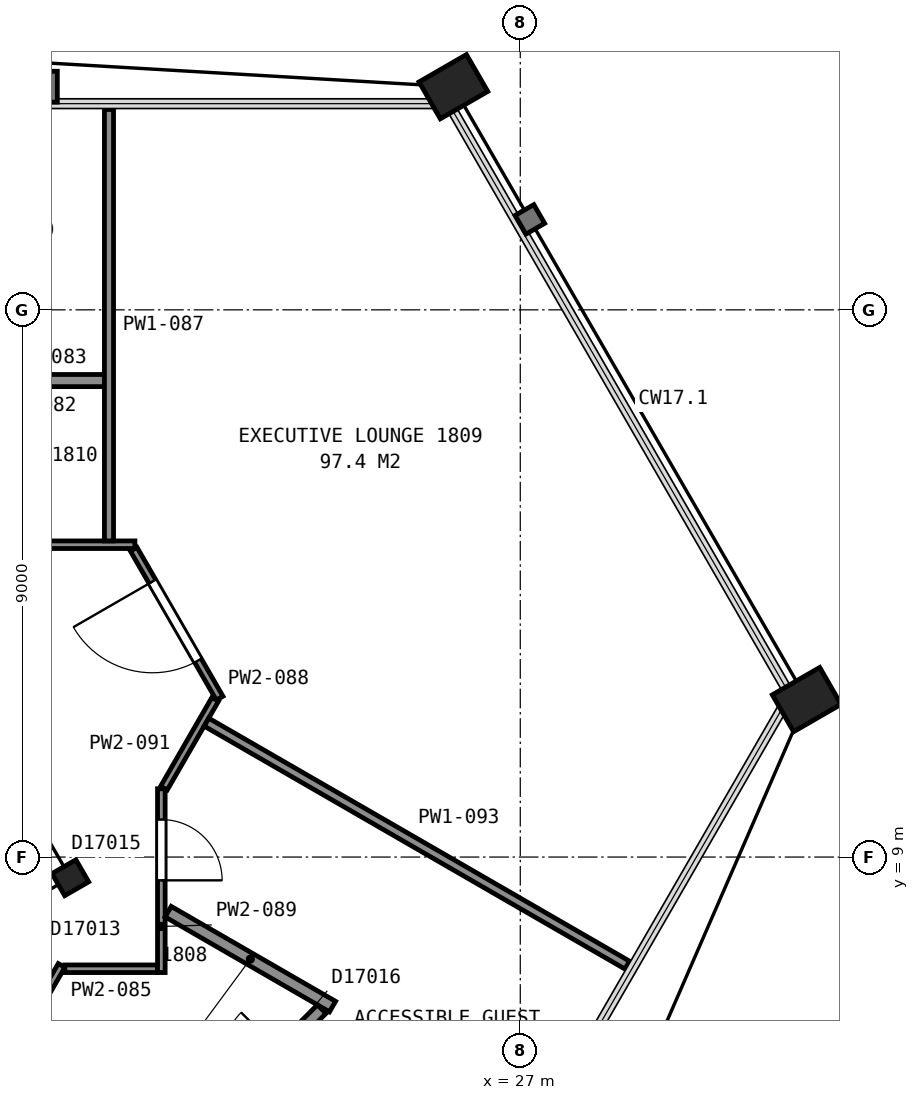
"""IFC4 building model, lengths in metres.
Left out: names, types, materials, properties, quantities, classifications, styles, units other than length and angle.
Written with IfcOpenShell. Run it as: python <this file> out.ifc"""

import sys

from ifc_helpers import new_model, si_unit, direction, frame, frame_2d, origin, origin_2d, place, context, subcontext, project, spatial, rectangle, hollow_rectangle, i_section, extrude, element, fill, save


model = new_model("IFC4")
c1 = context("Model", 3, precision=1e-05, world=origin(), true_north=direction((0.0, 1.0)))
c2 = subcontext(c1, "Body", "Model", "MODEL_VIEW")
j1 = project(units=[si_unit("LENGTHUNIT", "METRE"), si_unit("PLANEANGLEUNIT", "RADIAN")], contexts=[c1])
p1 = place(None, origin())
s1 = spatial("IfcSite", under=j1, at=p1, CompositionType="ELEMENT")
p2 = place(p1, origin())
s2 = spatial("IfcBuilding", under=s1, at=p2, CompositionType="ELEMENT")
p3 = place(p2, frame((0.0, 0.0, 80.0)))
s3 = spatial("IfcBuildingStorey", under=s2, at=p3, CompositionType="ELEMENT", Elevation=80.0)
for number, where, z_axis, x_axis in (
    (1, (25.9, 21.67, 0.0), (0.0, 0.0, 1.0), (0.5, -0.866, 0.0)),
    (2, (31.71, 11.59, 0.0), (0.0, 0.0, 1.0), (0.5, -0.866, 0.0)),
):
    element("IfcColumn", number, at=place(p3, frame(where, z_axis=z_axis, x_axis=x_axis)), inside=s3, PredefinedType="COLUMN", context=c2, shape_type="SweptSolid", body=[
        extrude(hollow_rectangle(XDim=0.7, YDim=0.9, WallThickness=0.065, at=origin_2d()), origin(), (0.0, 0.0, 1.0), 3.6),
    ])
p4 = place(p3, frame((19.6, 8.66, 0.0), z_axis=(0.0, 0.0, 1.0), x_axis=(0.5, -0.866025403784, 0.0)))
e3 = element("IfcColumn", 3, at=p4, inside=s3, PredefinedType="COLUMN", context=c2, shape_type="SweptSolid", body=[
    extrude(i_section(OverallWidth=0.419, OverallDepth=0.455, WebThickness=0.042, FlangeThickness=0.068, FilletRadius=0.015, at=origin_2d()), origin(), (0.0, 0.0, 1.0), 3.6),
])
p5 = place(p3, frame((-20.663, 14.137, 0.0), z_axis=(0.0, 0.0, 1.0), x_axis=(1.0, 0.0, 0.0)))
e4 = element("IfcWall", 4, at=p5, inside=s3, PredefinedType="PARTITIONING", context=c2, shape_type="SweptSolid", body=[
    extrude(rectangle(XDim=41.325, YDim=0.125, at=frame_2d((20.663, 0.0))), origin(), (0.0, 0.0, 1.0), 2.613),
])
p6 = place(p5, frame((37.071, 0.0, 0.0)))
e5 = element("IfcOpeningElement", 5, at=p6, cuts=e4, PredefinedType="OPENING", context=c2, shape_type="SweptSolid", body=[
    extrude(rectangle(XDim=0.9, YDim=2.1, at=frame_2d((0.45, 1.05))), frame((0.0, 0.073, 0.0), z_axis=(0.0, -1.0, 0.0), x_axis=(1.0, 0.0, 0.0)), (0.0, 0.0, 1.0), 0.145),
])
p7 = place(p5, frame((34.272, 0.0, 0.0)))
e6 = element("IfcOpeningElement", 6, at=p7, cuts=e4, PredefinedType="OPENING", context=c2, shape_type="SweptSolid", body=[
    extrude(rectangle(XDim=1.0, YDim=2.1, at=frame_2d((0.5, 1.05))), frame((0.0, 0.073, 0.0), z_axis=(0.0, -1.0, 0.0), x_axis=(1.0, 0.0, 0.0)), (0.0, 0.0, 1.0), 0.145),
])
p8 = place(p5, frame((26.496, 0.0, 0.0)))
e7 = element("IfcOpeningElement", 7, at=p8, cuts=e4, PredefinedType="OPENING", context=c2, shape_type="SweptSolid", body=[
    extrude(rectangle(XDim=0.9, YDim=2.1, at=frame_2d((0.45, 1.05))), frame((0.0, 0.073, 0.0), z_axis=(0.0, -1.0, 0.0), x_axis=(1.0, 0.0, 0.0)), (0.0, 0.0, 1.0), 0.145),
])
p9 = place(p5, frame((23.917, 0.0, 0.0)))
e8 = element("IfcOpeningElement", 8, at=p9, cuts=e4, PredefinedType="OPENING", context=c2, shape_type="SweptSolid", body=[
    extrude(rectangle(XDim=0.9, YDim=2.1, at=frame_2d((0.45, 1.05))), frame((0.0, 0.073, 0.0), z_axis=(0.0, -1.0, 0.0), x_axis=(1.0, 0.0, 0.0)), (0.0, 0.0, 1.0), 0.145),
])
p10 = place(p5, frame((16.78, 0.0, 0.0)))
e9 = element("IfcOpeningElement", 9, at=p10, cuts=e4, PredefinedType="OPENING", context=c2, shape_type="SweptSolid", body=[
    extrude(rectangle(XDim=0.9, YDim=2.1, at=frame_2d((0.45, 1.05))), frame((0.0, 0.073, 0.0), z_axis=(0.0, -1.0, 0.0), x_axis=(1.0, 0.0, 0.0)), (0.0, 0.0, 1.0), 0.145),
])
p11 = place(p5, frame((13.952, 0.0, 0.0)))
e10 = element("IfcOpeningElement", 10, at=p11, cuts=e4, PredefinedType="OPENING", context=c2, shape_type="SweptSolid", body=[
    extrude(rectangle(XDim=0.9, YDim=2.1, at=frame_2d((0.45, 1.05))), frame((0.0, 0.073, 0.0), z_axis=(0.0, -1.0, 0.0), x_axis=(1.0, 0.0, 0.0)), (0.0, 0.0, 1.0), 0.145),
])
p12 = place(p5, frame((7.175, 0.0, 0.0)))
e11 = element("IfcOpeningElement", 11, at=p12, cuts=e4, PredefinedType="OPENING", context=c2, shape_type="SweptSolid", body=[
    extrude(rectangle(XDim=0.9, YDim=2.1, at=frame_2d((0.45, 1.05))), frame((0.0, 0.073, 0.0), z_axis=(0.0, -1.0, 0.0), x_axis=(1.0, 0.0, 0.0)), (0.0, 0.0, 1.0), 0.145),
])
p13 = place(p5, frame((4.376, 0.0, 0.0)))
e12 = element("IfcOpeningElement", 12, at=p13, cuts=e4, PredefinedType="OPENING", context=c2, shape_type="SweptSolid", body=[
    extrude(rectangle(XDim=1.0, YDim=2.1, at=frame_2d((0.5, 1.05))), frame((0.0, 0.073, 0.0), z_axis=(0.0, -1.0, 0.0), x_axis=(1.0, 0.0, 0.0)), (0.0, 0.0, 1.0), 0.145),
])
p14 = place(p3, frame((19.456, 7.217, 0.0), z_axis=(0.0, 0.0, 1.0), x_axis=(-0.50002170027, -0.866012874765, 0.0)))
e13 = element("IfcWall", 13, at=p14, inside=s3, PredefinedType="PARTITIONING", context=c2, shape_type="SweptSolid", body=[
    extrude(rectangle(XDim=31.379, YDim=0.125, at=frame_2d((15.69, 0.0))), origin(), (0.0, 0.0, 1.0), 2.613),
])
p15 = place(p14, frame((26.843, 0.0, 0.0)))
e14 = element("IfcOpeningElement", 14, at=p15, cuts=e13, PredefinedType="OPENING", context=c2, shape_type="SweptSolid", body=[
    extrude(rectangle(XDim=1.0, YDim=2.1, at=frame_2d((0.5, 1.05))), frame((0.0, 0.073, 0.0), z_axis=(0.0, -1.0, 0.0), x_axis=(1.0, 0.0, 0.0)), (0.0, 0.0, 1.0), 0.145),
])
p16 = place(p14, frame((24.03, 0.0, 0.0)))
e15 = element("IfcOpeningElement", 15, at=p16, cuts=e13, PredefinedType="OPENING", context=c2, shape_type="SweptSolid", body=[
    extrude(rectangle(XDim=0.9, YDim=2.1, at=frame_2d((0.45, 1.05))), frame((0.0, 0.073, 0.0), z_axis=(0.0, -1.0, 0.0), x_axis=(1.0, 0.0, 0.0)), (0.0, 0.0, 1.0), 0.145),
])
p17 = place(p14, frame((17.159, 0.0, 0.0)))
e16 = element("IfcOpeningElement", 16, at=p17, cuts=e13, PredefinedType="OPENING", context=c2, shape_type="SweptSolid", body=[
    extrude(rectangle(XDim=0.9, YDim=2.1, at=frame_2d((0.45, 1.05))), frame((0.0, 0.073, 0.0), z_axis=(0.0, -1.0, 0.0), x_axis=(1.0, 0.0, 0.0)), (0.0, 0.0, 1.0), 0.145),
])
p18 = place(p14, frame((14.24, 0.0, 0.0)))
e17 = element("IfcOpeningElement", 17, at=p18, cuts=e13, PredefinedType="OPENING", context=c2, shape_type="SweptSolid", body=[
    extrude(rectangle(XDim=0.9, YDim=2.1, at=frame_2d((0.45, 1.05))), frame((0.0, 0.073, 0.0), z_axis=(0.0, -1.0, 0.0), x_axis=(1.0, 0.0, 0.0)), (0.0, 0.0, 1.0), 0.145),
])
p19 = place(p14, frame((6.997, 0.0, 0.0)))
e18 = element("IfcOpeningElement", 18, at=p19, cuts=e13, PredefinedType="OPENING", context=c2, shape_type="SweptSolid", body=[
    extrude(rectangle(XDim=0.9, YDim=2.1, at=frame_2d((0.45, 1.05))), frame((0.0, 0.073, 0.0), z_axis=(0.0, -1.0, 0.0), x_axis=(1.0, 0.0, 0.0)), (0.0, 0.0, 1.0), 0.145),
])
p20 = place(p14, frame((4.327, 0.0, 0.0)))
e19 = element("IfcOpeningElement", 19, at=p20, cuts=e13, PredefinedType="OPENING", context=c2, shape_type="SweptSolid", body=[
    extrude(rectangle(XDim=0.9, YDim=2.1, at=frame_2d((0.45, 1.05))), frame((0.0, 0.073, 0.0), z_axis=(0.0, -1.0, 0.0), x_axis=(1.0, 0.0, 0.0)), (0.0, 0.0, 1.0), 0.145),
])
p21 = place(p3, frame((18.236, 16.837, 0.0), z_axis=(0.0, 0.0, 1.0), x_axis=(1.0, 0.0, 0.0)))
e20 = element("IfcWall", 20, at=p21, inside=s3, PredefinedType="PARTITIONING", context=c2, shape_type="SweptSolid", body=[
    extrude(rectangle(XDim=1.925, YDim=0.2, at=frame_2d((0.962, 0.0))), origin(), (0.0, 0.0, 1.0), 2.613),
])
p22 = place(p3, frame((19.51, 7.163, 0.0), z_axis=(0.0, 0.0, 1.0), x_axis=(1.0, 0.0, 0.0)))
e21 = element("IfcWall", 21, at=p22, inside=s3, PredefinedType="PARTITIONING", context=c2, shape_type="SweptSolid", body=[
    extrude(rectangle(XDim=1.522, YDim=0.125, at=frame_2d((0.761, 0.0))), origin(), (0.0, 0.0, 1.0), 2.613),
])
p23 = place(p3, frame((20.236, 14.199, 0.0), z_axis=(0.0, 0.0, 1.0), x_axis=(0.0, 1.0, 0.0)))
e22 = element("IfcWall", 22, at=p23, inside=s3, PredefinedType="PARTITIONING", context=c2, shape_type="SweptSolid", body=[
    extrude(rectangle(XDim=7.095, YDim=0.15, at=frame_2d((3.548, 0.0))), origin(), (0.0, 0.0, 1.0), 2.613),
])
p24 = place(p3, frame((20.643, 14.063, 0.0), z_axis=(0.0, 0.0, 1.0), x_axis=(0.499647745683, -0.866228682412, 0.0)))
e23 = element("IfcWall", 23, at=p24, inside=s3, PredefinedType="PARTITIONING", context=c2, shape_type="SweptSolid", body=[
    extrude(rectangle(XDim=2.829, YDim=0.125, at=frame_2d((1.415, 0.0))), origin(), (0.0, 0.0, 1.0), 2.613),
])
p25 = place(p24, frame((0.615, 0.0, 0.0)))
e24 = element("IfcOpeningElement", 24, at=p25, cuts=e23, PredefinedType="OPENING", context=c2, shape_type="SweptSolid", body=[
    extrude(rectangle(XDim=1.5, YDim=2.1, at=frame_2d((0.75, 1.05))), frame((0.0, 0.073, 0.0), z_axis=(0.0, -1.0, 0.0), x_axis=(1.0, 0.0, 0.0)), (0.0, 0.0, 1.0), 0.145),
])
p26 = place(p3, frame((21.097, 10.123, 0.0), z_axis=(0.0, 0.0, 1.0), x_axis=(0.0, -1.0, 0.0)))
e25 = element("IfcWall", 25, at=p26, inside=s3, PredefinedType="PARTITIONING", context=c2, shape_type="SweptSolid", body=[
    extrude(rectangle(XDim=3.022, YDim=0.125, at=frame_2d((1.511, 0.0))), origin(), (0.0, 0.0, 1.0), 2.613),
])
p27 = place(p26, frame((0.506, 0.0, 0.0)))
e26 = element("IfcOpeningElement", 26, at=p27, cuts=e25, PredefinedType="OPENING", context=c2, shape_type="SweptSolid", body=[
    extrude(rectangle(XDim=1.0, YDim=2.1, at=frame_2d((0.5, 1.05))), frame((0.0, 0.073, 0.0), z_axis=(0.0, -1.0, 0.0), x_axis=(1.0, 0.0, 0.0)), (0.0, 0.0, 1.0), 0.145),
])
p28 = place(p3, frame((21.209, 8.102, 0.0), z_axis=(0.0, 0.0, 1.0), x_axis=(0.86597196262, -0.50009255139, 0.0)))
e27 = element("IfcWall", 27, at=p28, inside=s3, PredefinedType="PARTITIONING", context=c2, shape_type="SweptSolid", body=[
    extrude(rectangle(XDim=3.122, YDim=0.2, at=frame_2d((1.561, 0.0))), origin(), (0.0, 0.0, 1.0), 2.613),
])
p29 = place(p3, frame((21.139, 10.134, 0.0), z_axis=(0.0, 0.0, 1.0), x_axis=(0.500048373822, 0.865997473344, 0.0)))
e28 = element("IfcWall", 28, at=p29, inside=s3, PredefinedType="PARTITIONING", context=c2, shape_type="SweptSolid", body=[
    extrude(rectangle(XDim=1.686, YDim=0.125, at=frame_2d((0.843, 0.0))), origin(), (0.0, 0.0, 1.0), 2.613),
])
p30 = place(p3, frame((21.708, 4.466, 0.0), z_axis=(0.0, 0.0, 1.0), x_axis=(0.70578703929, 0.708424064506, 0.0)))
e29 = element("IfcWall", 29, at=p30, inside=s3, PredefinedType="PARTITIONING", context=c2, shape_type="SweptSolid", body=[
    extrude(rectangle(XDim=2.87, YDim=0.2, at=frame_2d((1.435, 0.0))), origin(), (0.0, 0.0, 1.0), 2.613),
])
p31 = place(p30, frame((0.996, 0.0, 0.0)))
e30 = element("IfcOpeningElement", 30, at=p31, cuts=e29, PredefinedType="OPENING", context=c2, shape_type="SweptSolid", body=[
    extrude(rectangle(XDim=0.9, YDim=2.1, at=frame_2d((0.45, 1.05))), frame((0.0, 0.11, 0.0), z_axis=(0.0, -1.0, 0.0), x_axis=(1.0, 0.0, 0.0)), (0.0, 0.0, 1.0), 0.22),
])
p32 = place(p3, frame((21.839, 11.219, 0.0), z_axis=(0.0, 0.0, 1.0), x_axis=(0.866019724796, -0.500009836168, 0.0)))
e31 = element("IfcWall", 31, at=p32, inside=s3, PredefinedType="PARTITIONING", context=c2, shape_type="SweptSolid", body=[
    extrude(rectangle(XDim=7.991, YDim=0.15, at=frame_2d((3.996, 0.0))), origin(), (0.0, 0.0, 1.0), 2.613),
])
p33 = place(p25, origin())
e32 = element("IfcDoor", 32, at=p33, inside=s3, OperationType="DOUBLE_DOOR_SINGLE_SWING", PredefinedType="DOOR", context=c2, shape_type="SweptSolid", body=[
    extrude(rectangle(XDim=1.5, YDim=2.1, at=frame_2d((0.75, 1.05))), frame((0.0, 0.025, 0.0), z_axis=(0.0, -1.0, 0.0), x_axis=(1.0, 0.0, 0.0)), (0.0, 0.0, 1.0), 0.05),
])
fill(e24, e32)
p34 = place(p27, origin())
e33 = element("IfcDoor", 33, at=p34, inside=s3, OperationType="SINGLE_SWING_RIGHT", PredefinedType="DOOR", context=c2, shape_type="SweptSolid", body=[
    extrude(rectangle(XDim=1.0, YDim=2.1, at=frame_2d((0.5, 1.05))), frame((0.0, 0.025, 0.0), z_axis=(0.0, -1.0, 0.0), x_axis=(1.0, 0.0, 0.0)), (0.0, 0.0, 1.0), 0.05),
])
fill(e26, e33)
save(model, sys.argv[1])
